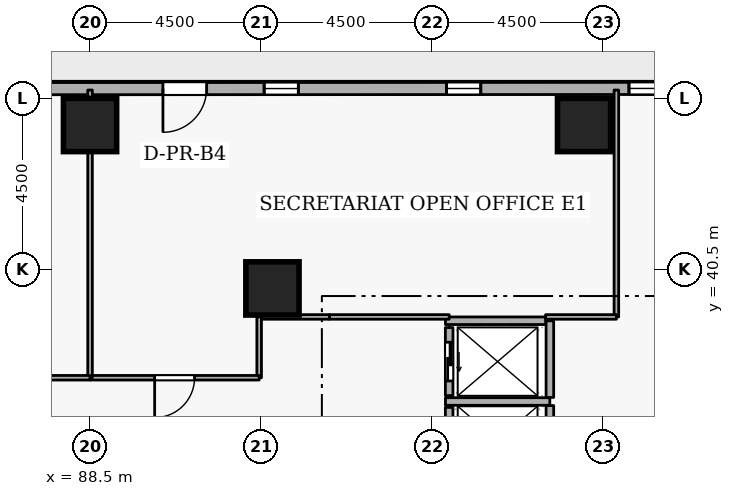
"""IFC4 building model, lengths in metres.
Left out: names, types, materials, properties, quantities, classifications, styles, units other than length and angle.
Written with IfcOpenShell. Run it as: python <this file> out.ifc"""

import sys

from ifc_helpers import new_model, si_unit, direction, frame, frame_2d, origin, origin_2d, place, context, subcontext, project, spatial, rectangle, extrude, element, fill, save


model = new_model("IFC4")
c1 = context("Model", 3, precision=1e-05, world=origin(), true_north=direction((0.0, 1.0)))
c2 = subcontext(c1, "Body", "Model", "MODEL_VIEW")
j1 = project(units=[si_unit("LENGTHUNIT", "METRE"), si_unit("PLANEANGLEUNIT", "RADIAN")], contexts=[c1])
p1 = place(None, origin())
s1 = spatial("IfcSite", under=j1, at=p1, CompositionType="ELEMENT")
p2 = place(p1, origin())
s2 = spatial("IfcBuilding", under=s1, at=p2, CompositionType="ELEMENT")
p3 = place(p2, frame((0.0, 0.0, 27.9)))
s3 = spatial("IfcBuildingStorey", under=s2, at=p3, CompositionType="ELEMENT", Elevation=27.9)
for number, where, z_axis, x_axis in (
    (1, (101.5, 44.3, 0.0), (0.0, 0.0, 1.0), (1.0, 0.0, 0.0)),
    (2, (88.5, 44.3, 0.0), (0.0, 0.0, 1.0), (1.0, 0.0, 0.0)),
    (3, (93.3, 40.0, 0.0), (0.0, 0.0, 1.0), (1.0, 0.0, 0.0)),
):
    element("IfcColumn", number, at=place(p3, frame(where, z_axis=z_axis, x_axis=x_axis)), inside=s3, PredefinedType="COLUMN", context=c2, shape_type="SweptSolid", body=[
        extrude(rectangle(XDim=1.4, YDim=1.4, at=origin_2d()), origin(), (0.0, 0.0, 1.0), 3.6),
    ])
p4 = place(p3, frame((110.181, 45.265, 0.0), z_axis=(0.0, 0.0, 1.0), x_axis=(-0.999999942296, -0.000339718087, 0.0)))
e4 = element("IfcWall", 4, at=p4, inside=s3, PredefinedType="STANDARD", context=c2, shape_type="SweptSolid", body=[
    extrude(rectangle(XDim=33.777, YDim=0.32, at=frame_2d((16.888, 0.0))), origin(), (0.0, 0.0, 1.0), 2.7),
])
p5 = place(p4, frame((18.614, 0.0, 0.0)))
e5 = element("IfcOpeningElement", 5, at=p5, cuts=e4, PredefinedType="OPENING", context=c2, shape_type="SweptSolid", body=[
    extrude(rectangle(XDim=1.15, YDim=2.1, at=frame_2d((0.575, 1.05))), frame((0.0, 0.17, 0.0), z_axis=(0.0, -1.0, 0.0), x_axis=(1.0, 0.0, 0.0)), (0.0, 0.0, 1.0), 0.34),
])
p6 = place(p4, frame((1.8, 0.0, 0.72)))
e6 = element("IfcOpeningElement", 6, at=p6, cuts=e4, PredefinedType="OPENING", context=c2, shape_type="SweptSolid", body=[
    extrude(rectangle(XDim=0.9, YDim=1.75, at=frame_2d((0.45, 0.875))), frame((0.0, 0.17, 0.0), z_axis=(0.0, -1.0, 0.0), x_axis=(1.0, 0.0, 0.0)), (0.0, 0.0, 1.0), 0.34),
])
p7 = place(p4, frame((6.6, 0.0, 0.72)))
e7 = element("IfcOpeningElement", 7, at=p7, cuts=e4, PredefinedType="OPENING", context=c2, shape_type="SweptSolid", body=[
    extrude(rectangle(XDim=0.9, YDim=1.75, at=frame_2d((0.45, 0.875))), frame((0.0, 0.17, 0.0), z_axis=(0.0, -1.0, 0.0), x_axis=(1.0, 0.0, 0.0)), (0.0, 0.0, 1.0), 0.34),
])
p8 = place(p4, frame((11.4, 0.0, 0.72)))
e8 = element("IfcOpeningElement", 8, at=p8, cuts=e4, PredefinedType="OPENING", context=c2, shape_type="SweptSolid", body=[
    extrude(rectangle(XDim=0.9, YDim=1.75, at=frame_2d((0.45, 0.875))), frame((0.0, 0.17, 0.0), z_axis=(0.0, -1.0, 0.0), x_axis=(1.0, 0.0, 0.0)), (0.0, 0.0, 1.0), 0.34),
])
p9 = place(p4, frame((16.2, 0.0, 0.72)))
e9 = element("IfcOpeningElement", 9, at=p9, cuts=e4, PredefinedType="OPENING", context=c2, shape_type="SweptSolid", body=[
    extrude(rectangle(XDim=0.9, YDim=1.75, at=frame_2d((0.45, 0.875))), frame((0.0, 0.17, 0.0), z_axis=(0.0, -1.0, 0.0), x_axis=(1.0, 0.0, 0.0)), (0.0, 0.0, 1.0), 0.34),
])
p10 = place(p4, frame((25.8, 0.0, 0.72)))
e10 = element("IfcOpeningElement", 10, at=p10, cuts=e4, PredefinedType="OPENING", context=c2, shape_type="SweptSolid", body=[
    extrude(rectangle(XDim=0.9, YDim=1.75, at=frame_2d((0.45, 0.875))), frame((0.0, 0.17, 0.0), z_axis=(0.0, -1.0, 0.0), x_axis=(1.0, 0.0, 0.0)), (0.0, 0.0, 1.0), 0.34),
])
p11 = place(p4, frame((30.6, 0.0, 0.72)))
e11 = element("IfcOpeningElement", 11, at=p11, cuts=e4, PredefinedType="OPENING", context=c2, shape_type="SweptSolid", body=[
    extrude(rectangle(XDim=0.9, YDim=1.75, at=frame_2d((0.45, 0.875))), frame((0.0, 0.17, 0.0), z_axis=(0.0, -1.0, 0.0), x_axis=(1.0, 0.0, 0.0)), (0.0, 0.0, 1.0), 0.34),
])
p12 = place(p3, frame((97.95, 36.87, 0.0), z_axis=(0.0, 0.0, 1.0), x_axis=(0.0, -1.0, 0.0)))
e12 = element("IfcWall", 12, at=p12, inside=s3, PredefinedType="STANDARD", context=c2, shape_type="SweptSolid", body=[
    extrude(rectangle(XDim=1.74, YDim=0.2, at=frame_2d((0.87, 0.0))), origin(), (0.0, 0.0, 1.0), 3.34),
])
p13 = place(p12, frame((0.36, 0.0, 0.0)))
e13 = element("IfcOpeningElement", 13, at=p13, cuts=e12, PredefinedType="OPENING", context=c2, shape_type="SweptSolid", body=[
    extrude(rectangle(XDim=1.02, YDim=2.06, at=frame_2d((0.51, 1.03))), frame((0.0, 0.11, 0.0), z_axis=(0.0, -1.0, 0.0), x_axis=(1.0, 0.0, 0.0)), (0.0, 0.0, 1.0), 0.22),
])
p14 = place(p3, frame((97.95, 38.97, 0.0), z_axis=(0.0, 0.0, 1.0), x_axis=(0.0, -1.0, 0.0)))
e14 = element("IfcWall", 14, at=p14, inside=s3, PredefinedType="STANDARD", context=c2, shape_type="SweptSolid", body=[
    extrude(rectangle(XDim=1.79, YDim=0.2, at=frame_2d((0.895, 0.0))), origin(), (0.0, 0.0, 1.0), 3.34),
])
p15 = place(p14, frame((0.385, 0.0, 0.0)))
e15 = element("IfcOpeningElement", 15, at=p15, cuts=e14, PredefinedType="OPENING", context=c2, shape_type="SweptSolid", body=[
    extrude(rectangle(XDim=1.02, YDim=2.06, at=frame_2d((0.51, 1.03))), frame((0.0, 0.11, 0.0), z_axis=(0.0, -1.0, 0.0), x_axis=(1.0, 0.0, 0.0)), (0.0, 0.0, 1.0), 0.22),
])
p16 = place(p3, frame((97.852, 37.025, 0.0), z_axis=(0.0, 0.0, 1.0), x_axis=(1.0, 0.0, 0.0)))
e16 = element("IfcWall", 16, at=p16, inside=s3, PredefinedType="STANDARD", context=c2, shape_type="SweptSolid", body=[
    extrude(rectangle(XDim=2.746, YDim=0.2, at=frame_2d((1.373, 0.0))), origin(), (0.0, 0.0, 1.0), 3.34),
])
p17 = place(p3, frame((100.6, 35.062, 0.0), z_axis=(0.0, 0.0, 1.0), x_axis=(0.0, 1.0, 0.0)))
e17 = element("IfcWall", 17, at=p17, inside=s3, PredefinedType="STANDARD", context=c2, shape_type="SweptSolid", body=[
    extrude(rectangle(XDim=1.856, YDim=0.2, at=frame_2d((0.928, 0.0))), origin(), (0.0, 0.0, 1.0), 3.34),
])
p18 = place(p3, frame((100.6, 37.132, 0.0), z_axis=(0.0, 0.0, 1.0), x_axis=(0.0, 1.0, 0.0)))
e18 = element("IfcWall", 18, at=p18, inside=s3, PredefinedType="STANDARD", context=c2, shape_type="SweptSolid", body=[
    extrude(rectangle(XDim=2.016, YDim=0.2, at=frame_2d((1.008, 0.0))), origin(), (0.0, 0.0, 1.0), 3.34),
])
p19 = place(p3, frame((97.852, 39.15, 0.0), z_axis=(0.0, 0.0, 1.0), x_axis=(1.0, 0.0, 0.0)))
e19 = element("IfcWall", 19, at=p19, inside=s3, PredefinedType="STANDARD", context=c2, shape_type="SweptSolid", body=[
    extrude(rectangle(XDim=2.636, YDim=0.2, at=frame_2d((1.318, 0.0))), origin(), (0.0, 0.0, 1.0), 3.34),
])
p20 = place(p3, frame((97.95, 39.25, 0.0), z_axis=(0.0, 0.0, 1.0), x_axis=(-1.0, 0.0, 0.0)))
e20 = element("IfcWall", 20, at=p20, inside=s3, PredefinedType="PARTITIONING", context=c2, shape_type="SweptSolid", body=[
    extrude(rectangle(XDim=3.15, YDim=0.12, at=frame_2d((1.575, 0.0))), origin(), (0.0, 0.0, 1.0), 3.34),
])
p21 = place(p3, frame((94.8, 39.25, 0.0), z_axis=(0.0, 0.0, 1.0), x_axis=(-1.0, 0.0, 0.0)))
e21 = element("IfcWall", 21, at=p21, inside=s3, PredefinedType="PARTITIONING", context=c2, shape_type="SweptSolid", body=[
    extrude(rectangle(XDim=1.85, YDim=0.12, at=frame_2d((0.925, 0.0))), origin(), (0.0, 0.0, 1.0), 3.34),
])
p22 = place(p3, frame((92.95, 39.25, 0.0), z_axis=(0.0, 0.0, 1.0), x_axis=(0.0, -1.0, 0.0)))
e22 = element("IfcWall", 22, at=p22, inside=s3, PredefinedType="PARTITIONING", context=c2, shape_type="SweptSolid", body=[
    extrude(rectangle(XDim=1.6, YDim=0.12, at=frame_2d((0.8, 0.0))), origin(), (0.0, 0.0, 1.0), 3.34),
])
p23 = place(p3, frame((92.95, 37.65, 0.0), z_axis=(0.0, 0.0, 1.0), x_axis=(-1.0, 0.0, 0.0)))
e23 = element("IfcWall", 23, at=p23, inside=s3, PredefinedType="PARTITIONING", context=c2, shape_type="SweptSolid", body=[
    extrude(rectangle(XDim=4.45, YDim=0.12, at=frame_2d((2.225, 0.0))), origin(), (0.0, 0.0, 1.0), 3.34),
])
p24 = place(p23, frame((1.7, 0.0, 0.0)))
e24 = element("IfcOpeningElement", 24, at=p24, cuts=e23, PredefinedType="OPENING", context=c2, shape_type="SweptSolid", body=[
    extrude(rectangle(XDim=1.05, YDim=2.1, at=frame_2d((0.525, 1.05))), frame((0.0, 0.07, 0.0), z_axis=(0.0, -1.0, 0.0), x_axis=(1.0, 0.0, 0.0)), (0.0, 0.0, 1.0), 0.14),
])
p25 = place(p3, frame((88.5, 37.65, 0.0), z_axis=(0.0, 0.0, 1.0), x_axis=(0.0, 1.0, 0.0)))
e25 = element("IfcWall", 25, at=p25, inside=s3, PredefinedType="PARTITIONING", context=c2, shape_type="SweptSolid", body=[
    extrude(rectangle(XDim=7.57, YDim=0.12, at=frame_2d((3.785, 0.0))), origin(), (0.0, 0.0, 1.0), 2.878),
])
p26 = place(p3, frame((102.35, 45.22, 0.0), z_axis=(0.0, 0.0, 1.0), x_axis=(0.0, -1.0, 0.0)))
e26 = element("IfcWall", 26, at=p26, inside=s3, PredefinedType="PARTITIONING", context=c2, shape_type="SweptSolid", body=[
    extrude(rectangle(XDim=5.97, YDim=0.12, at=frame_2d((2.985, 0.0))), origin(), (0.0, 0.0, 1.0), 3.34),
])
p27 = place(p3, frame((102.35, 39.25, 0.0), z_axis=(0.0, 0.0, 1.0), x_axis=(-1.0, 0.0, 0.0)))
e27 = element("IfcWall", 27, at=p27, inside=s3, PredefinedType="PARTITIONING", context=c2, shape_type="SweptSolid", body=[
    extrude(rectangle(XDim=1.862, YDim=0.12, at=frame_2d((0.931, 0.0))), origin(), (0.0, 0.0, 1.0), 3.34),
])
p28 = place(p3, frame((88.5, 37.65, 0.0), z_axis=(0.0, 0.0, 1.0), x_axis=(-1.0, 0.0, 0.0)))
e28 = element("IfcWall", 28, at=p28, inside=s3, PredefinedType="PARTITIONING", context=c2, shape_type="SweptSolid", body=[
    extrude(rectangle(XDim=4.45, YDim=0.12, at=frame_2d((2.225, 0.0))), origin(), (0.0, 0.0, 1.0), 3.34),
])
p29 = place(p28, frame((1.7, 0.0, 0.0)))
e29 = element("IfcOpeningElement", 29, at=p29, cuts=e28, PredefinedType="OPENING", context=c2, shape_type="SweptSolid", body=[
    extrude(rectangle(XDim=1.05, YDim=2.1, at=frame_2d((0.525, 1.05))), frame((0.0, 0.07, 0.0), z_axis=(0.0, -1.0, 0.0), x_axis=(1.0, 0.0, 0.0)), (0.0, 0.0, 1.0), 0.14),
])
p30 = place(p5, origin())
e30 = element("IfcDoor", 30, at=p30, inside=s3, OperationType="SINGLE_SWING_RIGHT", PredefinedType="DOOR", context=c2, shape_type="SweptSolid", body=[
    extrude(rectangle(XDim=1.15, YDim=2.1, at=frame_2d((0.575, 1.05))), frame((0.0, 0.025, 0.0), z_axis=(0.0, -1.0, 0.0), x_axis=(1.0, 0.0, 0.0)), (0.0, 0.0, 1.0), 0.05),
])
fill(e5, e30)
p31 = place(p7, origin())
e31 = element("IfcWindow", 31, at=p31, inside=s3, PartitioningType="SINGLE_PANEL", PredefinedType="WINDOW", context=c2, shape_type="SweptSolid", body=[
    extrude(rectangle(XDim=0.9, YDim=1.75, at=frame_2d((0.45, 0.875))), frame((0.0, 0.03, 0.0), z_axis=(0.0, -1.0, 0.0), x_axis=(1.0, 0.0, 0.0)), (0.0, 0.0, 1.0), 0.06),
])
fill(e7, e31)
p32 = place(p8, origin())
e32 = element("IfcWindow", 32, at=p32, inside=s3, PartitioningType="SINGLE_PANEL", PredefinedType="WINDOW", context=c2, shape_type="SweptSolid", body=[
    extrude(rectangle(XDim=0.9, YDim=1.75, at=frame_2d((0.45, 0.875))), frame((0.0, 0.03, 0.0), z_axis=(0.0, -1.0, 0.0), x_axis=(1.0, 0.0, 0.0)), (0.0, 0.0, 1.0), 0.06),
])
fill(e8, e32)
p33 = place(p9, origin())
e33 = element("IfcWindow", 33, at=p33, inside=s3, PartitioningType="SINGLE_PANEL", PredefinedType="WINDOW", context=c2, shape_type="SweptSolid", body=[
    extrude(rectangle(XDim=0.9, YDim=1.75, at=frame_2d((0.45, 0.875))), frame((0.0, 0.03, 0.0), z_axis=(0.0, -1.0, 0.0), x_axis=(1.0, 0.0, 0.0)), (0.0, 0.0, 1.0), 0.06),
])
fill(e9, e33)
p34 = place(p15, origin())
e34 = element("IfcDoor", 34, at=p34, inside=s3, OperationType="SLIDING_TO_LEFT", PredefinedType="DOOR", context=c2, shape_type="SweptSolid", body=[
    extrude(rectangle(XDim=1.02, YDim=2.06, at=frame_2d((0.51, 1.03))), frame((0.0, 0.025, 0.0), z_axis=(0.0, -1.0, 0.0), x_axis=(1.0, 0.0, 0.0)), (0.0, 0.0, 1.0), 0.05),
])
fill(e15, e34)
p35 = place(p24, origin())
e35 = element("IfcDoor", 35, at=p35, inside=s3, OperationType="SINGLE_SWING_RIGHT", PredefinedType="DOOR", context=c2, shape_type="SweptSolid", body=[
    extrude(rectangle(XDim=1.05, YDim=2.1, at=frame_2d((0.525, 1.05))), frame((0.0, 0.025, 0.0), z_axis=(0.0, -1.0, 0.0), x_axis=(1.0, 0.0, 0.0)), (0.0, 0.0, 1.0), 0.05),
])
fill(e24, e35)
save(model, sys.argv[1])
